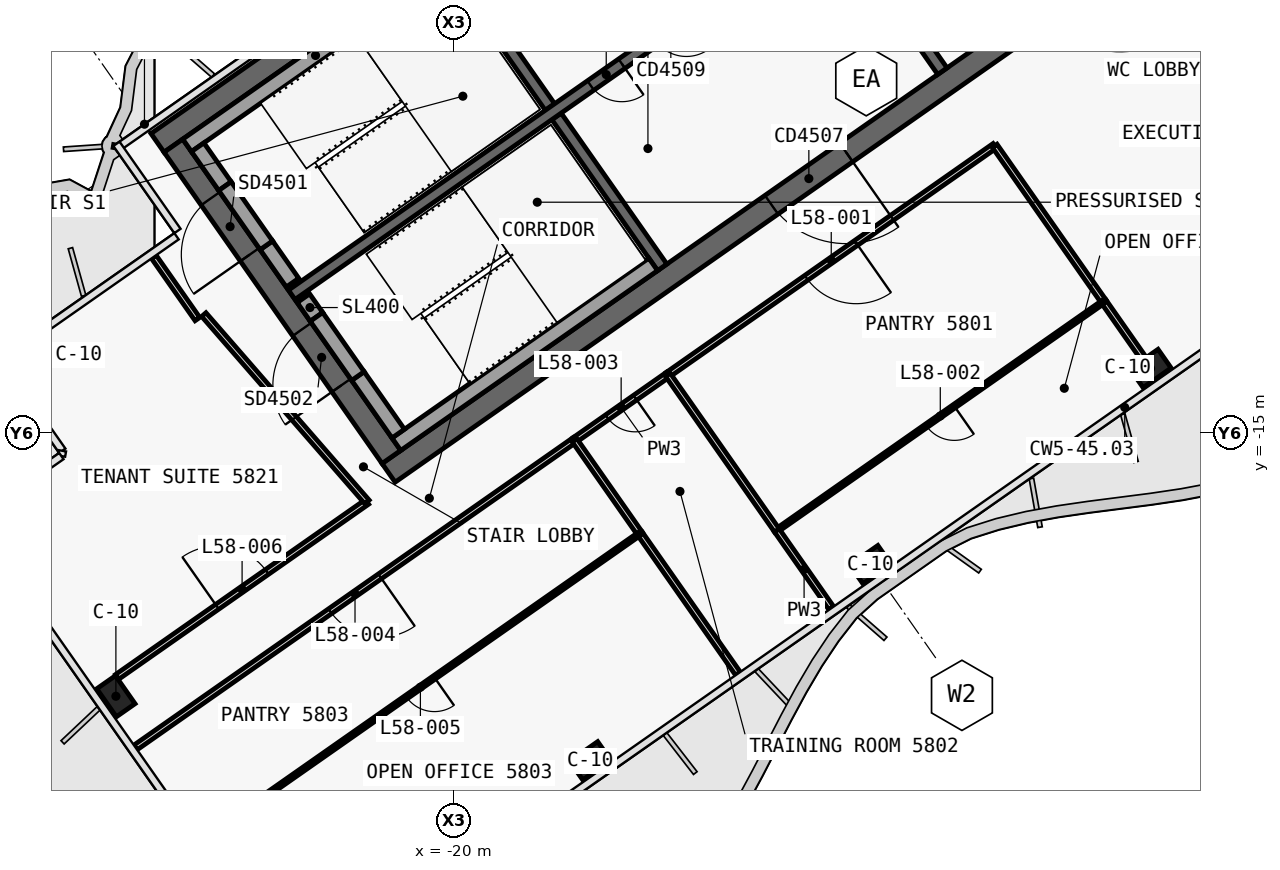
"""IFC4 building model, lengths in metres.
Left out: names, types, materials, properties, quantities, classifications, styles, units other than length and angle.
Written with IfcOpenShell. Run it as: python <this file> out.ifc"""

import sys

from ifc_helpers import new_model, si_unit, direction, frame, frame_2d, origin, origin_2d, place, context, subcontext, project, spatial, polyline, rectangle, outline, extrude, element, fill, save


model = new_model("IFC4")
c1 = context("Model", 3, precision=1e-05, world=origin(), true_north=direction((0.0, 1.0)))
c2 = subcontext(c1, "Body", "Model", "MODEL_VIEW")
j1 = project(units=[si_unit("LENGTHUNIT", "METRE"), si_unit("PLANEANGLEUNIT", "RADIAN")], contexts=[c1])
p1 = place(None, origin())
s1 = spatial("IfcSite", under=j1, at=p1, CompositionType="ELEMENT")
p2 = place(p1, origin())
s2 = spatial("IfcBuilding", under=s1, at=p2, CompositionType="ELEMENT")
p3 = place(p2, frame((0.0, 0.0, 248.8)))
s3 = spatial("IfcBuildingStorey", under=s2, at=p3, CompositionType="ELEMENT", Elevation=248.8)
p4 = place(p3, frame((-0.028, 12.066, 0.0), z_axis=(0.0, 0.0, 1.0), x_axis=(-0.819151382952, -0.573577380837, 0.0)))
e1 = element("IfcWall", 1, at=p4, inside=s3, PredefinedType="SHEAR", context=c2, shape_type="SweptSolid", body=[
    extrude(outline(polyline([(33.898, 0.3), (0.42, 0.3), (0.0, -0.3), (33.898, -0.3), (33.898, 0.3)])), origin(), (0.0, 0.0, 1.0), 3.9),
])
p5 = place(p3, frame((-0.028, -0.874, 0.0), z_axis=(0.0, 0.0, 1.0), x_axis=(-0.819150035022, -0.573579305871, 0.0)))
e2 = element("IfcWall", 2, at=p5, inside=s3, PredefinedType="SHEAR", context=c2, shape_type="SweptSolid", body=[
    extrude(outline(polyline([(26.476, 0.3), (0.42, 0.3), (0.0, -0.3), (26.476, -0.3), (26.476, 0.3)])), origin(), (0.0, 0.0, 1.0), 3.9),
])
p6 = place(p5, frame((2.976, 0.0, 0.0)))
e3 = element("IfcOpeningElement", 3, at=p6, cuts=e2, PredefinedType="OPENING", context=c2, shape_type="SweptSolid", body=[
    extrude(rectangle(XDim=2.4, YDim=2.1, at=frame_2d((1.2, 1.05))), frame((0.0, 0.31, 0.0), z_axis=(0.0, -1.0, 0.0), x_axis=(1.0, 0.0, 0.0)), (0.0, 0.0, 1.0), 0.62),
])
p7 = place(p5, frame((11.776, 0.0, 0.0)))
e4 = element("IfcOpeningElement", 4, at=p7, cuts=e2, PredefinedType="OPENING", context=c2, shape_type="SweptSolid", body=[
    extrude(rectangle(XDim=2.4, YDim=2.1, at=frame_2d((1.2, 1.05))), frame((0.0, 0.31, 0.0), z_axis=(0.0, -1.0, 0.0), x_axis=(1.0, 0.0, 0.0)), (0.0, 0.0, 1.0), 0.62),
])
p8 = place(p3, frame((-21.642, -15.642, 0.0), z_axis=(0.0, 0.0, 1.0), x_axis=(-0.573586866468, 0.819144740944, 0.0)))
e5 = element("IfcWall", 5, at=p8, inside=s3, PredefinedType="SHEAR", context=c2, shape_type="SweptSolid", body=[
    extrude(outline(polyline([(0.0, 0.3), (0.0, -0.3), (10.0, -0.3), (10.0, 0.3), (0.0, 0.3)])), origin(), (0.0, 0.0, 1.0), 3.9),
])
p9 = place(p8, frame((6.5, 0.0, 0.0)))
e6 = element("IfcOpeningElement", 6, at=p9, cuts=e5, PredefinedType="OPENING", context=c2, shape_type="SweptSolid", body=[
    extrude(rectangle(XDim=1.8, YDim=2.1, at=frame_2d((0.9, 1.05))), frame((0.0, 0.31, 0.0), z_axis=(0.0, -1.0, 0.0), x_axis=(1.0, 0.0, 0.0)), (0.0, 0.0, 1.0), 0.62),
])
p10 = place(p8, frame((2.3, 0.0, 0.0)))
e7 = element("IfcOpeningElement", 7, at=p10, cuts=e5, PredefinedType="OPENING", context=c2, shape_type="SweptSolid", body=[
    extrude(rectangle(XDim=1.8, YDim=2.1, at=frame_2d((0.9, 1.05))), frame((0.0, 0.31, 0.0), z_axis=(0.0, -1.0, 0.0), x_axis=(1.0, 0.0, 0.0)), (0.0, 0.0, 1.0), 0.62),
])
p11 = place(p3, frame((-7.143, -5.49, 0.0), z_axis=(0.0, 0.0, 1.0), x_axis=(-0.573617744349, 0.819123118565, 0.0)))
e8 = element("IfcWall", 8, at=p11, inside=s3, PredefinedType="SHEAR", context=c2, shape_type="SweptSolid", body=[
    extrude(outline(polyline([(4.85, 0.15), (0.0, 0.15), (0.0, -0.15), (4.85, -0.15), (4.85, 0.15)])), origin(), (0.0, 0.0, 1.0), 3.9),
])
p12 = place(p3, frame((-14.515, -10.652, 0.0), z_axis=(0.0, 0.0, 1.0), x_axis=(-0.573560315113, 0.819163332265, 0.0)))
e9 = element("IfcWall", 9, at=p12, inside=s3, PredefinedType="SHEAR", context=c2, shape_type="SweptSolid", body=[
    extrude(outline(polyline([(4.85, 0.15), (0.0, 0.15), (0.0, -0.15), (4.85, -0.15), (4.85, 0.15)])), origin(), (0.0, 0.0, 1.0), 3.9),
])
p13 = place(p3, frame((-17.469, -6.433, 0.0), z_axis=(0.0, 0.0, 1.0), x_axis=(-0.573594092424, 0.81913968109, 0.0)))
e10 = element("IfcWall", 10, at=p13, inside=s3, PredefinedType="SHEAR", context=c2, shape_type="SweptSolid", body=[
    extrude(outline(polyline([(4.85, -0.15), (4.85, 0.15), (0.0, 0.15), (0.0, -0.15), (4.85, -0.15)])), origin(), (0.0, 0.0, 1.0), 3.9),
])
p14 = place(p3, frame((-2.638, 3.768, 0.0), z_axis=(0.0, 0.0, 1.0), x_axis=(-0.819155014212, -0.573572194837, 0.0)))
e11 = element("IfcWall", 11, at=p14, inside=s3, PredefinedType="SHEAR", context=c2, shape_type="SweptSolid", body=[
    extrude(outline(polyline([(26.4, 0.15), (0.0, 0.15), (0.0, -0.15), (26.4, -0.15), (26.4, 0.15)])), origin(), (0.0, 0.0, 1.0), 3.9),
])
p15 = place(p14, frame((1.169, 0.0, 0.0)))
e12 = element("IfcOpeningElement", 12, at=p15, cuts=e11, PredefinedType="OPENING", context=c2, shape_type="SweptSolid", body=[
    extrude(rectangle(XDim=1.1, YDim=2.1, at=frame_2d((0.55, 1.05))), frame((0.0, 0.16, 0.0), z_axis=(0.0, -1.0, 0.0), x_axis=(1.0, 0.0, 0.0)), (0.0, 0.0, 1.0), 0.32),
])
p16 = place(p14, frame((3.206, 0.0, 0.0)))
e13 = element("IfcOpeningElement", 13, at=p16, cuts=e11, PredefinedType="OPENING", context=c2, shape_type="SweptSolid", body=[
    extrude(rectangle(XDim=1.1, YDim=2.1, at=frame_2d((0.55, 1.05))), frame((0.0, 0.16, 0.0), z_axis=(0.0, -1.0, 0.0), x_axis=(1.0, 0.0, 0.0)), (0.0, 0.0, 1.0), 0.32),
])
p17 = place(p14, frame((5.244, 0.0, 0.0)))
e14 = element("IfcOpeningElement", 14, at=p17, cuts=e11, PredefinedType="OPENING", context=c2, shape_type="SweptSolid", body=[
    extrude(rectangle(XDim=1.1, YDim=2.1, at=frame_2d((0.55, 1.05))), frame((0.0, 0.16, 0.0), z_axis=(0.0, -1.0, 0.0), x_axis=(1.0, 0.0, 0.0)), (0.0, 0.0, 1.0), 0.32),
])
p18 = place(p14, frame((7.281, 0.0, 0.0)))
e15 = element("IfcOpeningElement", 15, at=p18, cuts=e11, PredefinedType="OPENING", context=c2, shape_type="SweptSolid", body=[
    extrude(rectangle(XDim=1.1, YDim=2.1, at=frame_2d((0.55, 1.05))), frame((0.0, 0.16, 0.0), z_axis=(0.0, -1.0, 0.0), x_axis=(1.0, 0.0, 0.0)), (0.0, 0.0, 1.0), 0.32),
])
p19 = place(p14, frame((9.688, 0.0, 0.0)))
e16 = element("IfcOpeningElement", 16, at=p19, cuts=e11, PredefinedType="OPENING", context=c2, shape_type="SweptSolid", body=[
    extrude(rectangle(XDim=1.1, YDim=2.1, at=frame_2d((0.55, 1.05))), frame((0.0, 0.16, 0.0), z_axis=(0.0, -1.0, 0.0), x_axis=(1.0, 0.0, 0.0)), (0.0, 0.0, 1.0), 0.32),
])
p20 = place(p14, frame((11.863, 0.0, 0.0)))
e17 = element("IfcOpeningElement", 17, at=p20, cuts=e11, PredefinedType="OPENING", context=c2, shape_type="SweptSolid", body=[
    extrude(rectangle(XDim=1.1, YDim=2.1, at=frame_2d((0.55, 1.05))), frame((0.0, 0.16, 0.0), z_axis=(0.0, -1.0, 0.0), x_axis=(1.0, 0.0, 0.0)), (0.0, 0.0, 1.0), 0.32),
])
p21 = place(p14, frame((13.722, 0.0, 0.0)))
e18 = element("IfcOpeningElement", 18, at=p21, cuts=e11, PredefinedType="OPENING", context=c2, shape_type="SweptSolid", body=[
    extrude(rectangle(XDim=1.0, YDim=2.1, at=frame_2d((0.5, 1.05))), frame((0.0, 0.16, 0.0), z_axis=(0.0, -1.0, 0.0), x_axis=(1.0, 0.0, 0.0)), (0.0, 0.0, 1.0), 0.32),
])
p22 = place(p14, frame((15.798, 0.0, 0.0)))
e19 = element("IfcOpeningElement", 19, at=p22, cuts=e11, PredefinedType="OPENING", context=c2, shape_type="SweptSolid", body=[
    extrude(rectangle(XDim=1.0, YDim=2.1, at=frame_2d((0.5, 1.05))), frame((0.0, 0.16, 0.0), z_axis=(0.0, -1.0, 0.0), x_axis=(1.0, 0.0, 0.0)), (0.0, 0.0, 1.0), 0.32),
])
for number, where, z_axis, x_axis in (
    (20, (-1.665, -13.313, 0.0), (0.0, 0.0, 1.0), (-0.819, -0.574, 0.0)),
    (21, (-9.038, -18.475, 0.0), (0.0, 0.0, 1.0), (-0.819, -0.574, 0.0)),
    (22, (-16.41, -23.637, 0.0), (0.0, 0.0, 1.0), (-0.819, -0.574, 0.0)),
    (23, (-30.969, -12.956, 0.0), (0.0, 0.0, 1.0), (-0.819, -0.574, 0.0)),
    (24, (-28.891, -21.939, 0.0), (0.0, 0.0, 1.0), (-0.574, 0.819, 0.0)),
):
    element("IfcColumn", number, at=place(p3, frame(where, z_axis=z_axis, x_axis=x_axis)), inside=s3, PredefinedType="COLUMN", context=c2, shape_type="SweptSolid", body=[
        extrude(rectangle(XDim=0.9, YDim=0.6, at=origin_2d()), origin(), (0.0, 0.0, 1.0), 3.9),
    ])
p23 = place(p3, frame((-20.259, -2.71, 0.0), z_axis=(0.0, 0.0, 1.0), x_axis=(-0.81914849389, -0.573581506813, 0.0)))
e25 = element("IfcWall", 25, at=p23, inside=s3, PredefinedType="SOLIDWALL", context=c2, shape_type="SweptSolid", body=[
    extrude(rectangle(XDim=8.25, YDim=0.4, at=frame_2d((4.125, 0.0))), origin(), (0.0, 0.0, 1.0), 3.62),
])
p24 = place(p3, frame((-24.244, -11.055, 0.0), z_axis=(0.0, 0.0, 1.0), x_axis=(-0.573571582932, 0.819155442668, 0.0)))
e26 = element("IfcWall", 26, at=p24, inside=s3, PredefinedType="SOLIDWALL", context=c2, shape_type="SweptSolid", body=[
    extrude(rectangle(XDim=1.2, YDim=0.4, at=frame_2d((0.6, 0.0))), origin(), (0.0, 0.0, 1.0), 3.62),
])
p25 = place(p3, frame((-26.022, -8.515, 0.0), z_axis=(0.0, 0.0, 1.0), x_axis=(-0.573619628835, 0.819121798889, 0.0)))
e27 = element("IfcWall", 27, at=p25, inside=s3, PredefinedType="SOLIDWALL", context=c2, shape_type="SweptSolid", body=[
    extrude(rectangle(XDim=1.25, YDim=0.4, at=frame_2d((0.625, 0.0))), origin(), (0.0, 0.0, 1.0), 3.62),
])
p26 = place(p3, frame((-24.932, -10.072, 2.15), z_axis=(0.0, 0.0, 1.0), x_axis=(-0.573591692345, 0.819141361715, 0.0)))
e28 = element("IfcWall", 28, at=p26, inside=s3, PredefinedType="SOLIDWALL", context=c2, shape_type="SweptSolid", body=[
    extrude(rectangle(XDim=1.9, YDim=0.4, at=frame_2d((0.95, 0.0))), origin(), (0.0, 0.0, 1.0), 1.47),
])
p27 = place(p3, frame((-14.753, -10.574, 0.0), z_axis=(0.0, 0.0, 1.0), x_axis=(-0.819158229677, -0.573567602601, 0.0)))
e29 = element("IfcWall", 29, at=p27, inside=s3, PredefinedType="SOLIDWALL", context=c2, shape_type="SweptSolid", body=[
    extrude(rectangle(XDim=8.25, YDim=0.4, at=frame_2d((4.125, 0.0))), origin(), (0.0, 0.0, 1.0), 3.62),
])
p28 = place(p3, frame((-21.462, -15.028, 0.0), z_axis=(0.0, 0.0, 1.0), x_axis=(-0.573559770908, 0.819163713305, 0.0)))
e30 = element("IfcWall", 30, at=p28, inside=s3, PredefinedType="SOLIDWALL", context=c2, shape_type="SweptSolid", body=[
    extrude(rectangle(XDim=1.85, YDim=0.4, at=frame_2d((0.925, 0.0))), origin(), (0.0, 0.0, 1.0), 3.62),
])
p29 = place(p3, frame((-23.613, -11.956, 0.0), z_axis=(0.0, 0.0, 1.0), x_axis=(-0.573435029941, 0.819251039936, 0.0)))
e31 = element("IfcWall", 31, at=p29, inside=s3, PredefinedType="SOLIDWALL", context=c2, shape_type="SweptSolid", body=[
    extrude(rectangle(XDim=0.6, YDim=0.4, at=frame_2d((0.3, 0.0))), origin(), (0.0, 0.0, 1.0), 3.62),
])
p30 = place(p3, frame((-22.523, -13.512, 2.15), z_axis=(0.0, 0.0, 1.0), x_axis=(-0.573591692345, 0.819141361715, 0.0)))
e32 = element("IfcWall", 32, at=p30, inside=s3, PredefinedType="SOLIDWALL", context=c2, shape_type="SweptSolid", body=[
    extrude(rectangle(XDim=1.9, YDim=0.4, at=frame_2d((0.95, 0.0))), origin(), (0.0, 0.0, 1.0), 1.47),
])
p31 = place(p3, frame((-28.858, -21.428, 0.0), z_axis=(0.0, 0.0, 1.0), x_axis=(0.819137602434, 0.573597060905, 0.0)))
e33 = element("IfcWall", 33, at=p31, inside=s3, PredefinedType="PARTITIONING", context=c2, shape_type="SweptSolid", body=[
    extrude(rectangle(XDim=8.027, YDim=0.15, at=frame_2d((4.013, 0.0))), origin(), (0.0, 0.0, 1.0), 3.05),
])
p32 = place(p31, frame((3.213, 0.0, 0.0)))
e34 = element("IfcOpeningElement", 34, at=p32, cuts=e33, PredefinedType="OPENING", context=c2, shape_type="SweptSolid", body=[
    extrude(rectangle(XDim=1.6, YDim=2.1, at=frame_2d((0.8, 1.05))), frame((0.0, 0.085, 0.0), z_axis=(0.0, -1.0, 0.0), x_axis=(1.0, 0.0, 0.0)), (0.0, 0.0, 1.0), 0.17),
])
p33 = place(p3, frame((-5.766, -7.456, 0.0), z_axis=(0.0, 0.0, 1.0), x_axis=(-0.819154371039, -0.573573113393, 0.0)))
e35 = element("IfcWall", 35, at=p33, inside=s3, PredefinedType="PARTITIONING", context=c2, shape_type="SweptSolid", body=[
    extrude(rectangle(XDim=10.502, YDim=0.15, at=frame_2d((5.251, 0.0))), origin(), (0.0, 0.0, 1.0), 3.05),
])
p34 = place(p33, frame((4.451, 0.0, 0.0)))
e36 = element("IfcOpeningElement", 36, at=p34, cuts=e35, PredefinedType="OPENING", context=c2, shape_type="SweptSolid", body=[
    extrude(rectangle(XDim=1.6, YDim=2.1, at=frame_2d((0.8, 1.05))), frame((0.0, 0.085, 0.0), z_axis=(0.0, -1.0, 0.0), x_axis=(1.0, 0.0, 0.0)), (0.0, 0.0, 1.0), 0.17),
])
p35 = place(p3, frame((-14.366, -13.477, 0.0), z_axis=(0.0, 0.0, 1.0), x_axis=(-0.819193738533, -0.573516886193, 0.0)))
e37 = element("IfcWall", 37, at=p35, inside=s3, PredefinedType="PARTITIONING", context=c2, shape_type="SweptSolid", body=[
    extrude(rectangle(XDim=3.004, YDim=0.15, at=frame_2d((1.502, 0.0))), origin(), (0.0, 0.0, 1.0), 3.62),
])
p36 = place(p35, frame((1.052, 0.0, 0.0)))
e38 = element("IfcOpeningElement", 38, at=p36, cuts=e37, PredefinedType="OPENING", context=c2, shape_type="SweptSolid", body=[
    extrude(rectangle(XDim=0.9, YDim=2.1, at=frame_2d((0.45, 1.05))), frame((0.0, 0.085, 0.0), z_axis=(0.0, -1.0, 0.0), x_axis=(1.0, 0.0, 0.0)), (0.0, 0.0, 1.0), 0.17),
])
p37 = place(p3, frame((-16.823, -15.198, 0.0), z_axis=(0.0, 0.0, 1.0), x_axis=(-0.819152205979, -0.573576205434, 0.0)))
e39 = element("IfcWall", 39, at=p37, inside=s3, PredefinedType="PARTITIONING", context=c2, shape_type="SweptSolid", body=[
    extrude(rectangle(XDim=14.102, YDim=0.15, at=frame_2d((7.051, 0.0))), origin(), (0.0, 0.0, 1.0), 3.0),
])
p38 = place(p37, frame((6.251, 0.0, 0.0)))
e40 = element("IfcOpeningElement", 40, at=p38, cuts=e39, PredefinedType="OPENING", context=c2, shape_type="SweptSolid", body=[
    extrude(rectangle(XDim=1.6, YDim=2.1, at=frame_2d((0.8, 1.05))), frame((0.0, 0.085, 0.0), z_axis=(0.0, -1.0, 0.0), x_axis=(1.0, 0.0, 0.0)), (0.0, 0.0, 1.0), 0.17),
])
p39 = place(p3, frame((-1.849, -13.051, 0.0), z_axis=(0.0, 0.0, 1.0), x_axis=(-0.573542889209, 0.819175533227, 0.0)))
e41 = element("IfcWall", 41, at=p39, inside=s3, PredefinedType="PARTITIONING", context=c2, shape_type="SweptSolid", body=[
    extrude(rectangle(XDim=1.831, YDim=0.15, at=frame_2d((0.916, 0.0))), origin(), (0.0, 0.0, 1.0), 3.05),
])
p40 = place(p3, frame((-2.897, -11.553, 0.0), z_axis=(0.0, 0.0, 1.0), x_axis=(-0.573593309886, 0.819140229054, 0.0)))
e42 = element("IfcWall", 42, at=p40, inside=s3, PredefinedType="PARTITIONING", context=c2, shape_type="SweptSolid", body=[
    extrude(rectangle(XDim=5.004, YDim=0.15, at=frame_2d((2.502, 0.0))), origin(), (0.0, 0.0, 1.0), 3.05),
])
p41 = place(p3, frame((-26.746, -12.014, 0.0), z_axis=(0.0, 0.0, 1.0), x_axis=(-0.573568836472, 0.819157365729, 0.0)))
e43 = element("IfcWall", 43, at=p41, inside=s3, PredefinedType="PARTITIONING", context=c2, shape_type="SweptSolid", body=[
    extrude(rectangle(XDim=2.0, YDim=0.15, at=frame_2d((1.0, 0.0))), origin(), (0.0, 0.0, 1.0), 3.05),
])
p42 = place(p3, frame((-22.284, -16.826, 0.0), z_axis=(0.0, 0.0, 1.0), x_axis=(-0.656758142177, 0.754101281449, 0.0)))
e44 = element("IfcWall", 44, at=p42, inside=s3, PredefinedType="PARTITIONING", context=c2, shape_type="SweptSolid", body=[
    extrude(rectangle(XDim=6.539, YDim=0.15, at=frame_2d((3.269, 0.0))), origin(), (0.0, 0.0, 1.0), 3.62),
])
p43 = place(p3, frame((-2.898, -11.552, 0.0), z_axis=(0.0, 0.0, 1.0), x_axis=(-0.819155448096, -0.573571575181, 0.0)))
e45 = element("IfcWall", 45, at=p43, inside=s3, PredefinedType="PARTITIONING", context=c2, shape_type="SweptSolid", body=[
    extrude(rectangle(XDim=10.5, YDim=0.1, at=frame_2d((5.25, 0.0))), origin(), (0.0, 0.0, 1.0), 3.05),
])
p44 = place(p43, frame((4.8, 0.0, 0.0)))
e46 = element("IfcOpeningElement", 46, at=p44, cuts=e45, PredefinedType="OPENING", context=c2, shape_type="SweptSolid", body=[
    extrude(rectangle(XDim=0.9, YDim=2.1, at=frame_2d((0.45, 1.05))), frame((0.0, 0.06, 0.0), z_axis=(0.0, -1.0, 0.0), x_axis=(1.0, 0.0, 0.0)), (0.0, 0.0, 1.0), 0.12),
])
p45 = place(p3, frame((-10.066, -19.622, 0.0), z_axis=(0.0, 0.0, 1.0), x_axis=(-0.573560689761, 0.819163069945, 0.0)))
e47 = element("IfcWall", 47, at=p45, inside=s3, PredefinedType="PARTITIONING", context=c2, shape_type="SweptSolid", body=[
    extrude(rectangle(XDim=2.499, YDim=0.15, at=frame_2d((1.25, 0.0))), origin(), (0.0, 0.0, 1.0), 3.0),
])
p46 = place(p3, frame((-11.5, -17.574, 0.0), z_axis=(0.0, 0.0, 1.0), x_axis=(-0.573586866468, 0.819144740944, 0.0)))
e48 = element("IfcWall", 48, at=p46, inside=s3, PredefinedType="PARTITIONING", context=c2, shape_type="SweptSolid", body=[
    extrude(rectangle(XDim=5.0, YDim=0.15, at=frame_2d((2.5, 0.0))), origin(), (0.0, 0.0, 1.0), 3.62),
])
p47 = place(p3, frame((-12.523, -21.343, 0.0), z_axis=(0.0, 0.0, 1.0), x_axis=(-0.573556991349, 0.819165659482, 0.0)))
e49 = element("IfcWall", 49, at=p47, inside=s3, PredefinedType="PARTITIONING", context=c2, shape_type="SweptSolid", body=[
    extrude(rectangle(XDim=4.501, YDim=0.15, at=frame_2d((2.25, 0.0))), origin(), (0.0, 0.0, 1.0), 3.0),
])
p48 = place(p3, frame((-15.103, -17.658, 0.0), z_axis=(0.0, 0.0, 1.0), x_axis=(-0.573604249862, 0.819132568355, 0.0)))
e50 = element("IfcWall", 50, at=p48, inside=s3, PredefinedType="PARTITIONING", context=c2, shape_type="SweptSolid", body=[
    extrude(rectangle(XDim=3.002, YDim=0.15, at=frame_2d((1.501, 0.0))), origin(), (0.0, 0.0, 1.0), 3.62),
])
p49 = place(p3, frame((-15.104, -17.657, 0.0), z_axis=(0.0, 0.0, 1.0), x_axis=(-0.81915300772, -0.573575060427, 0.0)))
e51 = element("IfcWall", 51, at=p49, inside=s3, PredefinedType="PARTITIONING", context=c2, shape_type="SweptSolid", body=[
    extrude(rectangle(XDim=14.1, YDim=0.1, at=frame_2d((7.05, 0.0))), origin(), (0.0, 0.0, 1.0), 3.0),
])
p50 = place(p49, frame((6.6, 0.0, 0.0)))
e52 = element("IfcOpeningElement", 52, at=p50, cuts=e51, PredefinedType="OPENING", context=c2, shape_type="SweptSolid", body=[
    extrude(rectangle(XDim=0.9, YDim=2.1, at=frame_2d((0.45, 1.05))), frame((0.0, 0.06, 0.0), z_axis=(0.0, -1.0, 0.0), x_axis=(1.0, 0.0, 0.0)), (0.0, 0.0, 1.0), 0.12),
])
p51 = place(p22, origin())
e53 = element("IfcDoor", 53, at=p51, inside=s3, OperationType="SINGLE_SWING_RIGHT", PredefinedType="DOOR", context=c2, shape_type="SweptSolid", body=[
    extrude(rectangle(XDim=1.0, YDim=2.1, at=frame_2d((0.5, 1.05))), frame((0.0, 0.025, 0.0), z_axis=(0.0, -1.0, 0.0), x_axis=(1.0, 0.0, 0.0)), (0.0, 0.0, 1.0), 0.05),
])
fill(e19, e53)
p52 = place(p7, origin())
e54 = element("IfcDoor", 54, at=p52, inside=s3, OperationType="DOUBLE_DOOR_SINGLE_SWING", PredefinedType="DOOR", context=c2, shape_type="SweptSolid", body=[
    extrude(rectangle(XDim=2.4, YDim=2.1, at=frame_2d((1.2, 1.05))), frame((0.0, 0.025, 0.0), z_axis=(0.0, -1.0, 0.0), x_axis=(1.0, 0.0, 0.0)), (0.0, 0.0, 1.0), 0.05),
])
fill(e4, e54)
p53 = place(p9, origin())
e55 = element("IfcDoor", 55, at=p53, inside=s3, OperationType="DOUBLE_DOOR_SINGLE_SWING", PredefinedType="DOOR", context=c2, shape_type="SweptSolid", body=[
    extrude(rectangle(XDim=1.8, YDim=2.1, at=frame_2d((0.9, 1.05))), frame((0.0, 0.025, 0.0), z_axis=(0.0, -1.0, 0.0), x_axis=(1.0, 0.0, 0.0)), (0.0, 0.0, 1.0), 0.05),
])
fill(e6, e55)
p54 = place(p10, origin())
e56 = element("IfcDoor", 56, at=p54, inside=s3, OperationType="DOUBLE_DOOR_SINGLE_SWING", PredefinedType="DOOR", context=c2, shape_type="SweptSolid", body=[
    extrude(rectangle(XDim=1.8, YDim=2.1, at=frame_2d((0.9, 1.05))), frame((0.0, 0.025, 0.0), z_axis=(0.0, -1.0, 0.0), x_axis=(1.0, 0.0, 0.0)), (0.0, 0.0, 1.0), 0.05),
])
fill(e7, e56)
p55 = place(p34, origin())
e57 = element("IfcDoor", 57, at=p55, inside=s3, OperationType="DOUBLE_DOOR_SINGLE_SWING", PredefinedType="DOOR", context=c2, shape_type="SweptSolid", body=[
    extrude(rectangle(XDim=1.6, YDim=2.1, at=frame_2d((0.8, 1.05))), frame((0.0, 0.025, 0.0), z_axis=(0.0, -1.0, 0.0), x_axis=(1.0, 0.0, 0.0)), (0.0, 0.0, 1.0), 0.05),
])
fill(e36, e57)
p56 = place(p44, origin())
e58 = element("IfcDoor", 58, at=p56, inside=s3, OperationType="SINGLE_SWING_LEFT", PredefinedType="DOOR", context=c2, shape_type="SweptSolid", body=[
    extrude(rectangle(XDim=0.9, YDim=2.1, at=frame_2d((0.45, 1.05))), frame((0.0, 0.025, 0.0), z_axis=(0.0, -1.0, 0.0), x_axis=(1.0, 0.0, 0.0)), (0.0, 0.0, 1.0), 0.05),
])
fill(e46, e58)
p57 = place(p36, origin())
e59 = element("IfcDoor", 59, at=p57, inside=s3, OperationType="SINGLE_SWING_RIGHT", PredefinedType="DOOR", context=c2, shape_type="SweptSolid", body=[
    extrude(rectangle(XDim=0.9, YDim=2.1, at=frame_2d((0.45, 1.05))), frame((0.0, 0.025, 0.0), z_axis=(0.0, -1.0, 0.0), x_axis=(1.0, 0.0, 0.0)), (0.0, 0.0, 1.0), 0.05),
])
fill(e38, e59)
p58 = place(p38, origin())
e60 = element("IfcDoor", 60, at=p58, inside=s3, OperationType="DOUBLE_DOOR_SINGLE_SWING", PredefinedType="DOOR", context=c2, shape_type="SweptSolid", body=[
    extrude(rectangle(XDim=1.6, YDim=2.1, at=frame_2d((0.8, 1.05))), frame((0.0, 0.025, 0.0), z_axis=(0.0, -1.0, 0.0), x_axis=(1.0, 0.0, 0.0)), (0.0, 0.0, 1.0), 0.05),
])
fill(e40, e60)
p59 = place(p50, origin())
e61 = element("IfcDoor", 61, at=p59, inside=s3, OperationType="SINGLE_SWING_RIGHT", PredefinedType="DOOR", context=c2, shape_type="SweptSolid", body=[
    extrude(rectangle(XDim=0.9, YDim=2.1, at=frame_2d((0.45, 1.05))), frame((0.0, 0.025, 0.0), z_axis=(0.0, -1.0, 0.0), x_axis=(1.0, 0.0, 0.0)), (0.0, 0.0, 1.0), 0.05),
])
fill(e52, e61)
p60 = place(p32, origin())
e62 = element("IfcDoor", 62, at=p60, inside=s3, OperationType="DOUBLE_DOOR_SINGLE_SWING", PredefinedType="DOOR", context=c2, shape_type="SweptSolid", body=[
    extrude(rectangle(XDim=1.6, YDim=2.1, at=frame_2d((0.8, 1.05))), frame((0.0, 0.025, 0.0), z_axis=(0.0, -1.0, 0.0), x_axis=(1.0, 0.0, 0.0)), (0.0, 0.0, 1.0), 0.05),
])
fill(e34, e62)
save(model, sys.argv[1])
